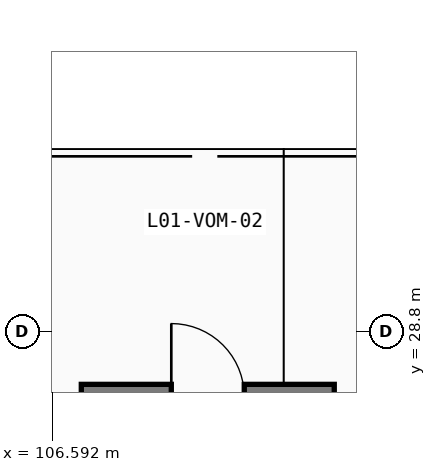
"""IFC4 building model, lengths in metres.
Left out: names, types, materials, properties, quantities, classifications, styles, units other than length and angle.
Written with IfcOpenShell. Run it as: python <this file> out.ifc"""

import sys

from ifc_helpers import new_model, si_unit, direction, frame, frame_2d, origin, place, context, subcontext, project, spatial, rectangle, extrude, element, save


model = new_model("IFC4")
c1 = context("Model", 3, precision=1e-05, world=origin(), true_north=direction((0.0, 1.0)))
c2 = subcontext(c1, "Body", "Model", "MODEL_VIEW")
j1 = project(units=[si_unit("LENGTHUNIT", "METRE"), si_unit("PLANEANGLEUNIT", "RADIAN")], contexts=[c1])
p1 = place(None, origin())
s1 = spatial("IfcSite", under=j1, at=p1, CompositionType="ELEMENT")
p2 = place(p1, origin())
s2 = spatial("IfcBuilding", under=s1, at=p2, CompositionType="ELEMENT")
p3 = place(p2, frame((0.0, 0.0, 4.8)))
s3 = spatial("IfcBuildingStorey", under=s2, at=p3, CompositionType="ELEMENT", Elevation=4.8)
p4 = place(p3, frame((111.23, 27.73, 0.0), z_axis=(0.0, 0.0, 1.0), x_axis=(-1.0, 0.0, 0.0)))
e1 = element("IfcWall", 1, at=p4, inside=s3, PredefinedType="SHEAR", context=c2, shape_type="SweptSolid", body=[
    extrude(rectangle(XDim=4.16, YDim=0.4, at=frame_2d((2.08, 0.0))), origin(), (0.0, 0.0, 1.0), 4.52),
])
p5 = place(p4, frame((2.68, 0.0, 0.0), z_axis=(0.0, 0.0, 1.0), x_axis=(-1.0, 0.0, 0.0)))
e2 = element("IfcOpeningElement", 2, at=p5, cuts=e1, PredefinedType="OPENING", context=c2, shape_type="SweptSolid", body=[
    extrude(rectangle(XDim=1.2, YDim=2.2, at=frame_2d((0.6, 1.1))), frame((0.0, 0.21, 0.0), z_axis=(0.0, -1.0, 0.0), x_axis=(1.0, 0.0, 0.0)), (0.0, 0.0, 1.0), 0.42),
])
save(model, sys.argv[1])
